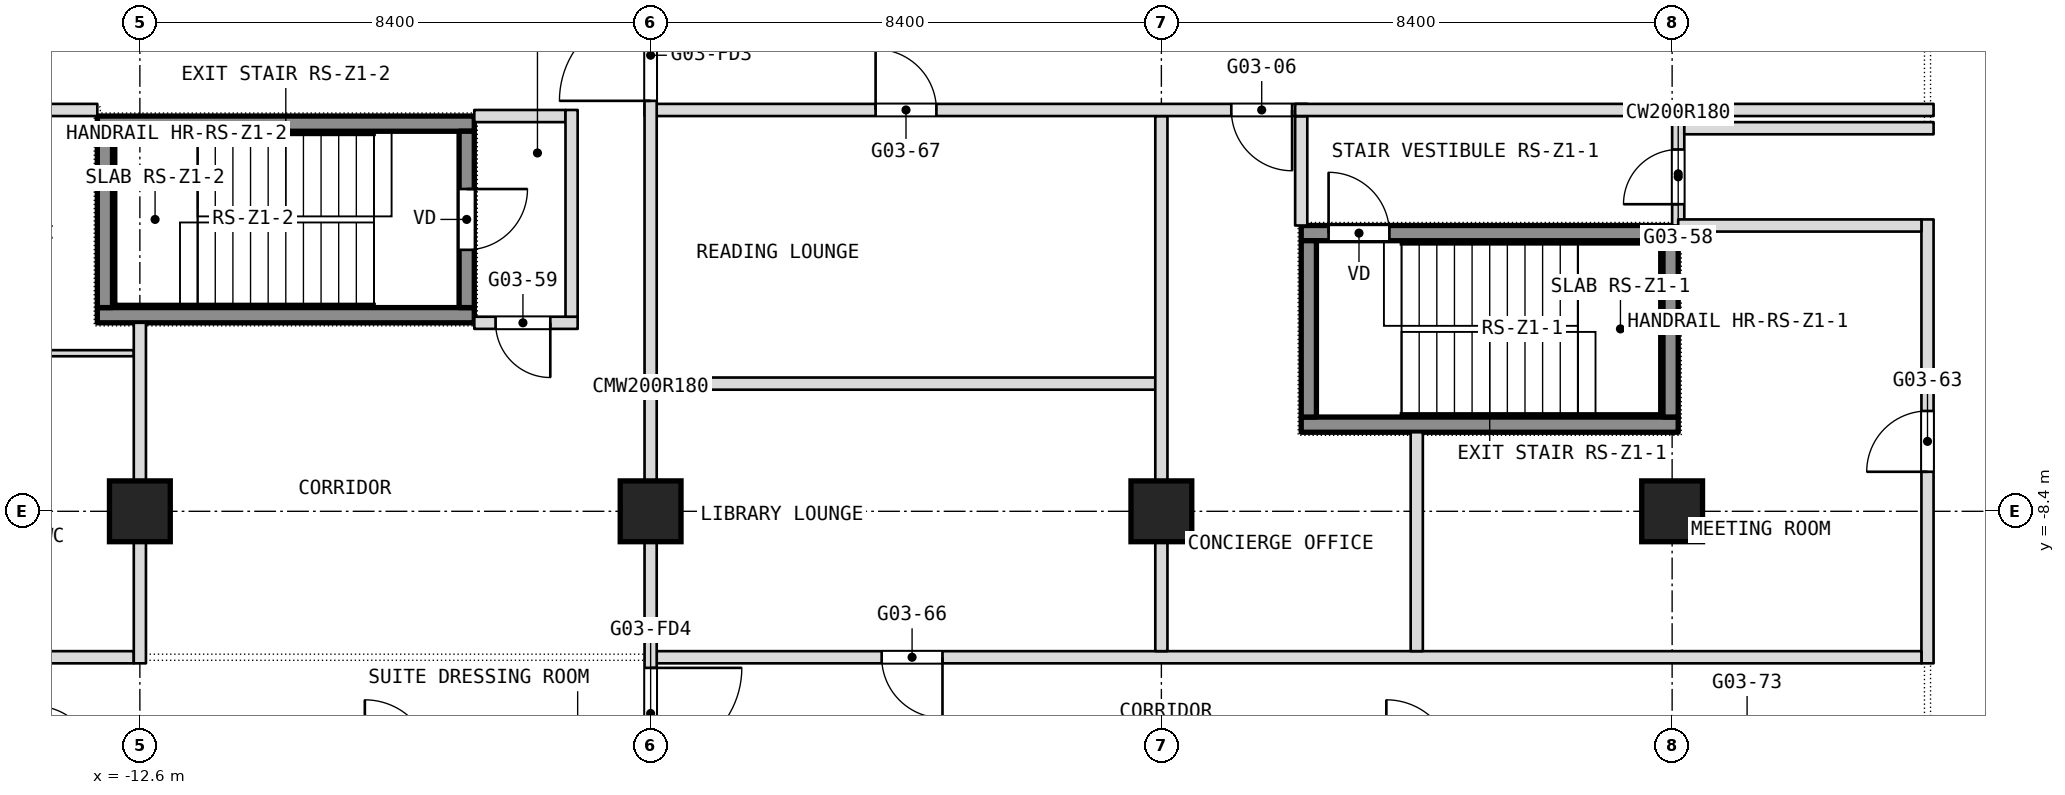
"""IFC4 building model, lengths in metres.
Left out: names, types, materials, properties, quantities, classifications, styles, units other than length and angle.
Written with IfcOpenShell. Run it as: python <this file> out.ifc"""

import sys

from ifc_helpers import new_model, si_unit, direction, frame, frame_2d, origin, origin_2d, place, context, subcontext, project, spatial, rectangle, extrude, element, fill, save


model = new_model("IFC4")
c1 = context("Model", 3, precision=1e-05, world=origin(), true_north=direction((0.0, 1.0)))
c2 = subcontext(c1, "Body", "Model", "MODEL_VIEW")
j1 = project(units=[si_unit("LENGTHUNIT", "METRE"), si_unit("PLANEANGLEUNIT", "RADIAN")], contexts=[c1])
p1 = place(None, origin())
s1 = spatial("IfcSite", under=j1, at=p1, CompositionType="ELEMENT")
p2 = place(p1, origin())
s2 = spatial("IfcBuilding", under=s1, at=p2, CompositionType="ELEMENT")
p3 = place(p2, frame((0.0, 0.0, 50.9)))
s3 = spatial("IfcBuildingStorey", under=s2, at=p3, CompositionType="ELEMENT", Elevation=50.9)
for number, where, z_axis, x_axis in (
    (1, (-12.6, -8.4, 0.0), (0.0, 0.0, 1.0), (1.0, 0.0, 0.0)),
    (2, (-4.2, -8.4, 0.0), (0.0, 0.0, 1.0), (1.0, 0.0, 0.0)),
    (3, (4.2, -8.4, 0.0), (0.0, 0.0, 1.0), (1.0, 0.0, 0.0)),
    (4, (12.6, -8.4, 0.0), (0.0, 0.0, 1.0), (1.0, 0.0, 0.0)),
):
    element("IfcColumn", number, at=place(p3, frame(where, z_axis=z_axis, x_axis=x_axis)), inside=s3, PredefinedType="COLUMN", context=c2, shape_type="SweptSolid", body=[
        extrude(rectangle(XDim=1.0, YDim=1.0, at=origin_2d()), origin(), (0.0, 0.0, 1.0), 3.6),
    ])
p4 = place(p3, frame((16.8, -10.9, 0.0), z_axis=(0.0, 0.0, 1.0), x_axis=(0.0, 1.0, 0.0)))
e5 = element("IfcWall", 5, at=p4, inside=s3, PredefinedType="PARTITIONING", context=c2, shape_type="SweptSolid", body=[
    extrude(rectangle(XDim=7.3, YDim=0.2, at=frame_2d((3.65, 0.0))), origin(), (0.0, 0.0, 1.0), 3.34),
])
p5 = place(p4, frame((3.15, 0.0, 0.0)))
e6 = element("IfcOpeningElement", 6, at=p5, cuts=e5, PredefinedType="OPENING", context=c2, shape_type="SweptSolid", body=[
    extrude(rectangle(XDim=1.0, YDim=2.1, at=frame_2d((0.5, 1.05))), frame((0.0, 0.1, 0.0), z_axis=(0.0, -1.0, 0.0), x_axis=(1.0, 0.0, 0.0)), (0.0, 0.0, 1.0), 0.2),
])
p6 = place(p3, frame((12.7, -3.7, 0.0), z_axis=(0.0, 0.0, 1.0), x_axis=(0.0, 1.0, 0.0)))
e7 = element("IfcWall", 7, at=p6, inside=s3, PredefinedType="PARTITIONING", context=c2, shape_type="SweptSolid", body=[
    extrude(rectangle(XDim=1.7, YDim=0.2, at=frame_2d((0.85, 0.0))), origin(), (0.0, 0.0, 1.0), 3.34),
])
p7 = place(p6, frame((0.35, 0.0, 0.0)))
e8 = element("IfcOpeningElement", 8, at=p7, cuts=e7, PredefinedType="OPENING", context=c2, shape_type="SweptSolid", body=[
    extrude(rectangle(XDim=0.9, YDim=2.1, at=frame_2d((0.45, 1.05))), frame((0.0, 0.1, 0.0), z_axis=(0.0, -1.0, 0.0), x_axis=(1.0, 0.0, 0.0)), (0.0, 0.0, 1.0), 0.2),
])
p8 = place(p3, frame((-16.7, -10.8, 0.0), z_axis=(0.0, 0.0, 1.0), x_axis=(1.0, 0.0, 0.0)))
e9 = element("IfcWall", 9, at=p8, inside=s3, PredefinedType="PARTITIONING", context=c2, shape_type="SweptSolid", body=[
    extrude(rectangle(XDim=4.0, YDim=0.2, at=frame_2d((2.0, 0.0))), origin(), (0.0, 0.0, 1.0), 3.34),
])
p9 = place(p3, frame((-4.1, -10.8, 0.0), z_axis=(0.0, 0.0, 1.0), x_axis=(1.0, 0.0, 0.0)))
e10 = element("IfcWall", 10, at=p9, inside=s3, PredefinedType="PARTITIONING", context=c2, shape_type="SweptSolid", body=[
    extrude(rectangle(XDim=20.8, YDim=0.2, at=frame_2d((10.4, 0.0))), origin(), (0.0, 0.0, 1.0), 3.34),
])
p10 = place(p9, frame((3.7, 0.0, 0.0)))
e11 = element("IfcOpeningElement", 11, at=p10, cuts=e10, PredefinedType="OPENING", context=c2, shape_type="SweptSolid", body=[
    extrude(rectangle(XDim=1.0, YDim=2.1, at=frame_2d((0.5, 1.05))), frame((0.0, 0.1, 0.0), z_axis=(0.0, -1.0, 0.0), x_axis=(1.0, 0.0, 0.0)), (0.0, 0.0, 1.0), 0.2),
])
p11 = place(p3, frame((8.4, -10.7, 0.0), z_axis=(0.0, 0.0, 1.0), x_axis=(0.0, 1.0, 0.0)))
e12 = element("IfcWall", 12, at=p11, inside=s3, PredefinedType="PARTITIONING", context=c2, shape_type="SweptSolid", body=[
    extrude(rectangle(XDim=3.6, YDim=0.2, at=frame_2d((1.8, 0.0))), origin(), (0.0, 0.0, 1.0), 3.34),
])
p12 = place(p3, frame((6.5, -3.7, 0.0), z_axis=(0.0, 0.0, 1.0), x_axis=(0.0, 1.0, 0.0)))
e13 = element("IfcWall", 13, at=p12, inside=s3, PredefinedType="PARTITIONING", context=c2, shape_type="SweptSolid", body=[
    extrude(rectangle(XDim=1.8, YDim=0.2, at=frame_2d((0.9, 0.0))), origin(), (0.0, 0.0, 1.0), 3.34),
])
p13 = place(p3, frame((-4.1, -6.3, 0.0), z_axis=(0.0, 0.0, 1.0), x_axis=(1.0, 0.0, 0.0)))
e14 = element("IfcWall", 14, at=p13, inside=s3, PredefinedType="PARTITIONING", context=c2, shape_type="SweptSolid", body=[
    extrude(rectangle(XDim=8.2, YDim=0.2, at=frame_2d((4.1, 0.0))), origin(), (0.0, 0.0, 1.0), 3.34),
])
p14 = place(p3, frame((-16.7, -5.8, 0.0), z_axis=(0.0, 0.0, 1.0), x_axis=(1.0, 0.0, 0.0)))
e15 = element("IfcWall", 15, at=p14, inside=s3, PredefinedType="PARTITIONING", context=c2, shape_type="SweptSolid", body=[
    extrude(rectangle(XDim=4.0, YDim=0.1, at=frame_2d((2.0, 0.0))), origin(), (0.0, 0.0, 1.0), 3.34),
])
p15 = place(p14, frame((1.55, 0.0, 0.0)))
e16 = element("IfcOpeningElement", 16, at=p15, cuts=e15, PredefinedType="OPENING", context=c2, shape_type="SweptSolid", body=[
    extrude(rectangle(XDim=0.9, YDim=2.1, at=frame_2d((0.45, 1.05))), frame((0.0, 0.05, 0.0), z_axis=(0.0, -1.0, 0.0), x_axis=(1.0, 0.0, 0.0)), (0.0, 0.0, 1.0), 0.1),
])
p16 = place(p3, frame((-7.1, -5.3, 0.0), z_axis=(0.0, 0.0, 1.0), x_axis=(1.0, 0.0, 0.0)))
e17 = element("IfcWall", 17, at=p16, inside=s3, PredefinedType="PARTITIONING", context=c2, shape_type="SweptSolid", body=[
    extrude(rectangle(XDim=1.7, YDim=0.2, at=frame_2d((0.85, 0.0))), origin(), (0.0, 0.0, 1.0), 3.34),
])
p17 = place(p16, frame((0.35, 0.0, 0.0)))
e18 = element("IfcOpeningElement", 18, at=p17, cuts=e17, PredefinedType="OPENING", context=c2, shape_type="SweptSolid", body=[
    extrude(rectangle(XDim=0.9, YDim=2.1, at=frame_2d((0.45, 1.05))), frame((0.0, 0.1, 0.0), z_axis=(0.0, -1.0, 0.0), x_axis=(1.0, 0.0, 0.0)), (0.0, 0.0, 1.0), 0.2),
])
p18 = place(p3, frame((4.2, -10.7, 0.0), z_axis=(0.0, 0.0, 1.0), x_axis=(0.0, 1.0, 0.0)))
e19 = element("IfcWall", 19, at=p18, inside=s3, PredefinedType="PARTITIONING", context=c2, shape_type="SweptSolid", body=[
    extrude(rectangle(XDim=8.8, YDim=0.2, at=frame_2d((4.4, 0.0))), origin(), (0.0, 0.0, 1.0), 3.34),
])
p19 = place(p3, frame((12.7, -3.7, 0.0), z_axis=(0.0, 0.0, 1.0), x_axis=(1.0, 0.0, 0.0)))
e20 = element("IfcWall", 20, at=p19, inside=s3, PredefinedType="PARTITIONING", context=c2, shape_type="SweptSolid", body=[
    extrude(rectangle(XDim=4.0, YDim=0.2, at=frame_2d((2.0, 0.0))), origin(), (0.0, 0.0, 1.0), 3.34),
])
p20 = place(p3, frame((12.8, -2.1, 0.0), z_axis=(0.0, 0.0, 1.0), x_axis=(1.0, 0.0, 0.0)))
e21 = element("IfcWall", 21, at=p20, inside=s3, PredefinedType="PARTITIONING", context=c2, shape_type="SweptSolid", body=[
    extrude(rectangle(XDim=4.1, YDim=0.2, at=frame_2d((2.05, 0.0))), origin(), (0.0, 0.0, 1.0), 3.34),
])
p21 = place(p3, frame((-7.1, -1.9, 0.0), z_axis=(0.0, 0.0, 1.0), x_axis=(1.0, 0.0, 0.0)))
e22 = element("IfcWall", 22, at=p21, inside=s3, PredefinedType="PARTITIONING", context=c2, shape_type="SweptSolid", body=[
    extrude(rectangle(XDim=1.5, YDim=0.2, at=frame_2d((0.75, 0.0))), origin(), (0.0, 0.0, 1.0), 3.34),
])
p22 = place(p3, frame((-16.9, -1.8, 0.0), z_axis=(0.0, 0.0, 1.0), x_axis=(1.0, 0.0, 0.0)))
e23 = element("IfcWall", 23, at=p22, inside=s3, PredefinedType="PARTITIONING", context=c2, shape_type="SweptSolid", body=[
    extrude(rectangle(XDim=3.6, YDim=0.2, at=frame_2d((1.8, 0.0))), origin(), (0.0, 0.0, 1.0), 3.34),
])
p23 = place(p22, frame((1.7, 0.0, 0.0)))
e24 = element("IfcOpeningElement", 24, at=p23, cuts=e23, PredefinedType="OPENING", context=c2, shape_type="SweptSolid", body=[
    extrude(rectangle(XDim=1.0, YDim=2.1, at=frame_2d((0.5, 1.05))), frame((0.0, 0.1, 0.0), z_axis=(0.0, -1.0, 0.0), x_axis=(1.0, 0.0, 0.0)), (0.0, 0.0, 1.0), 0.2),
])
p24 = place(p3, frame((-4.3, -1.8, 0.0), z_axis=(0.0, 0.0, 1.0), x_axis=(1.0, 0.0, 0.0)))
e25 = element("IfcWall", 25, at=p24, inside=s3, PredefinedType="PARTITIONING", context=c2, shape_type="SweptSolid", body=[
    extrude(rectangle(XDim=10.9, YDim=0.2, at=frame_2d((5.45, 0.0))), origin(), (0.0, 0.0, 1.0), 3.34),
])
p25 = place(p24, frame((9.65, 0.0, 0.0)))
e26 = element("IfcOpeningElement", 26, at=p25, cuts=e25, PredefinedType="OPENING", context=c2, shape_type="SweptSolid", body=[
    extrude(rectangle(XDim=1.0, YDim=2.1, at=frame_2d((0.5, 1.05))), frame((0.0, 0.1, 0.0), z_axis=(0.0, -1.0, 0.0), x_axis=(1.0, 0.0, 0.0)), (0.0, 0.0, 1.0), 0.2),
])
p26 = place(p24, frame((3.8, 0.0, 0.0)))
e27 = element("IfcOpeningElement", 27, at=p26, cuts=e25, PredefinedType="OPENING", context=c2, shape_type="SweptSolid", body=[
    extrude(rectangle(XDim=1.0, YDim=2.1, at=frame_2d((0.5, 1.05))), frame((0.0, 0.1, 0.0), z_axis=(0.0, -1.0, 0.0), x_axis=(1.0, 0.0, 0.0)), (0.0, 0.0, 1.0), 0.2),
])
p27 = place(p3, frame((6.4, -1.8, 0.0), z_axis=(0.0, 0.0, 1.0), x_axis=(1.0, 0.0, 0.0)))
e28 = element("IfcWall", 28, at=p27, inside=s3, PredefinedType="PARTITIONING", context=c2, shape_type="SweptSolid", body=[
    extrude(rectangle(XDim=10.5, YDim=0.2, at=frame_2d((5.25, 0.0))), origin(), (0.0, 0.0, 1.0), 3.34),
])
p28 = place(p3, frame((-4.2, -12.7, 0.0), z_axis=(0.0, 0.0, 1.0), x_axis=(0.0, 1.0, 0.0)))
e29 = element("IfcWall", 29, at=p28, inside=s3, PredefinedType="PARTITIONING", context=c2, shape_type="SweptSolid", body=[
    extrude(rectangle(XDim=12.7, YDim=0.2, at=frame_2d((6.35, 0.0))), origin(), (0.0, 0.0, 1.0), 3.34),
])
p29 = place(p28, frame((11.05, 0.0, 0.0)))
e30 = element("IfcOpeningElement", 30, at=p29, cuts=e29, PredefinedType="OPENING", context=c2, shape_type="SweptSolid", body=[
    extrude(rectangle(XDim=1.5, YDim=2.1, at=frame_2d((0.75, 1.05))), frame((0.0, 0.1, 0.0), z_axis=(0.0, -1.0, 0.0), x_axis=(1.0, 0.0, 0.0)), (0.0, 0.0, 1.0), 0.2),
])
p30 = place(p28, frame((0.225, 0.0, 0.0)))
e31 = element("IfcOpeningElement", 31, at=p30, cuts=e29, PredefinedType="OPENING", context=c2, shape_type="SweptSolid", body=[
    extrude(rectangle(XDim=1.5, YDim=2.1, at=frame_2d((0.75, 1.05))), frame((0.0, 0.1, 0.0), z_axis=(0.0, -1.0, 0.0), x_axis=(1.0, 0.0, 0.0)), (0.0, 0.0, 1.0), 0.2),
])
p31 = place(p3, frame((-5.5, -5.2, 0.0), z_axis=(0.0, 0.0, 1.0), x_axis=(0.0, 1.0, 0.0)))
e32 = element("IfcWall", 32, at=p31, inside=s3, PredefinedType="PARTITIONING", context=c2, shape_type="SweptSolid", body=[
    extrude(rectangle(XDim=3.4, YDim=0.2, at=frame_2d((1.7, 0.0))), origin(), (0.0, 0.0, 1.0), 3.34),
])
p32 = place(p3, frame((-12.6, -10.9, 0.0), z_axis=(0.0, 0.0, 1.0), x_axis=(0.0, 1.0, 0.0)))
e33 = element("IfcWall", 33, at=p32, inside=s3, PredefinedType="PARTITIONING", context=c2, shape_type="SweptSolid", body=[
    extrude(rectangle(XDim=5.6, YDim=0.2, at=frame_2d((2.8, 0.0))), origin(), (0.0, 0.0, 1.0), 3.34),
])
p33 = place(p3, frame((6.5, -6.975, 0.1), z_axis=(0.0, 0.0, 1.0), x_axis=(1.0, 0.0, 0.0)))
e34 = element("IfcWall", 34, at=p33, inside=s3, PredefinedType="SHEAR", context=c2, shape_type="SweptSolid", body=[
    extrude(rectangle(XDim=6.2, YDim=0.25, at=frame_2d((3.1, 0.0))), origin(), (0.0, 0.0, 1.0), 3.6),
])
p34 = place(p3, frame((6.5, -3.825, 0.1), z_axis=(0.0, 0.0, 1.0), x_axis=(1.0, 0.0, 0.0)))
e35 = element("IfcWall", 35, at=p34, inside=s3, PredefinedType="SHEAR", context=c2, shape_type="SweptSolid", body=[
    extrude(rectangle(XDim=6.2, YDim=0.25, at=frame_2d((3.1, 0.0))), origin(), (0.0, 0.0, 1.0), 3.6),
])
p35 = place(p34, frame((0.45, 0.0, 0.0)))
e36 = element("IfcOpeningElement", 36, at=p35, cuts=e35, PredefinedType="OPENING", context=c2, shape_type="SweptSolid", body=[
    extrude(rectangle(XDim=1.0, YDim=2.1, at=frame_2d((0.5, 1.05))), frame((0.0, 0.125, 0.0), z_axis=(0.0, -1.0, 0.0), x_axis=(1.0, 0.0, 0.0)), (0.0, 0.0, 1.0), 0.25),
])
for number, where, z_axis, x_axis in (
    (37, (6.625, -6.85, 0.1), (0.0, 0.0, 1.0), (0.0, 1.0, 0.0)),
    (38, (12.575, -6.85, 0.1), (0.0, 0.0, 1.0), (0.0, 1.0, 0.0)),
):
    element("IfcWall", number, at=place(p3, frame(where, z_axis=z_axis, x_axis=x_axis)), inside=s3, PredefinedType="SHEAR", context=c2, shape_type="SweptSolid", body=[
        extrude(rectangle(XDim=2.9, YDim=0.25, at=frame_2d((1.45, 0.0))), origin(), (0.0, 0.0, 1.0), 3.6),
    ])
for number, where, z_axis, x_axis in (
    (39, (-13.3, -5.175, 0.1), (0.0, 0.0, 1.0), (1.0, 0.0, 0.0)),
    (40, (-13.3, -2.025, 0.1), (0.0, 0.0, 1.0), (1.0, 0.0, 0.0)),
):
    element("IfcWall", number, at=place(p3, frame(where, z_axis=z_axis, x_axis=x_axis)), inside=s3, PredefinedType="SHEAR", context=c2, shape_type="SweptSolid", body=[
        extrude(rectangle(XDim=6.2, YDim=0.25, at=frame_2d((3.1, 0.0))), origin(), (0.0, 0.0, 1.0), 3.6),
    ])
p36 = place(p3, frame((-13.175, -5.05, 0.1), z_axis=(0.0, 0.0, 1.0), x_axis=(0.0, 1.0, 0.0)))
e41 = element("IfcWall", 41, at=p36, inside=s3, PredefinedType="SHEAR", context=c2, shape_type="SweptSolid", body=[
    extrude(rectangle(XDim=2.9, YDim=0.25, at=frame_2d((1.45, 0.0))), origin(), (0.0, 0.0, 1.0), 3.6),
])
p37 = place(p3, frame((-7.225, -5.05, 0.1), z_axis=(0.0, 0.0, 1.0), x_axis=(0.0, 1.0, 0.0)))
e42 = element("IfcWall", 42, at=p37, inside=s3, PredefinedType="SHEAR", context=c2, shape_type="SweptSolid", body=[
    extrude(rectangle(XDim=2.9, YDim=0.25, at=frame_2d((1.45, 0.0))), origin(), (0.0, 0.0, 1.0), 3.6),
])
p38 = place(p37, frame((0.95, 0.0, 0.0)))
e43 = element("IfcOpeningElement", 43, at=p38, cuts=e42, PredefinedType="OPENING", context=c2, shape_type="SweptSolid", body=[
    extrude(rectangle(XDim=1.0, YDim=2.1, at=frame_2d((0.5, 1.05))), frame((0.0, 0.125, 0.0), z_axis=(0.0, -1.0, 0.0), x_axis=(1.0, 0.0, 0.0)), (0.0, 0.0, 1.0), 0.25),
])
p39 = place(p5, origin())
e44 = element("IfcDoor", 44, at=p39, inside=s3, OperationType="SINGLE_SWING_LEFT", PredefinedType="DOOR", context=c2, shape_type="SweptSolid", body=[
    extrude(rectangle(XDim=1.0, YDim=2.1, at=frame_2d((0.5, 1.05))), frame((0.0, 0.025, 0.0), z_axis=(0.0, -1.0, 0.0), x_axis=(1.0, 0.0, 0.0)), (0.0, 0.0, 1.0), 0.05),
])
fill(e6, e44)
p40 = place(p7, origin())
e45 = element("IfcDoor", 45, at=p40, inside=s3, OperationType="SINGLE_SWING_LEFT", PredefinedType="DOOR", context=c2, shape_type="SweptSolid", body=[
    extrude(rectangle(XDim=0.9, YDim=2.1, at=frame_2d((0.45, 1.05))), frame((0.0, 0.025, 0.0), z_axis=(0.0, -1.0, 0.0), x_axis=(1.0, 0.0, 0.0)), (0.0, 0.0, 1.0), 0.05),
])
fill(e8, e45)
p41 = place(p10, origin())
e46 = element("IfcDoor", 46, at=p41, inside=s3, OperationType="SINGLE_SWING_RIGHT", PredefinedType="DOOR", context=c2, shape_type="SweptSolid", body=[
    extrude(rectangle(XDim=1.0, YDim=2.1, at=frame_2d((0.5, 1.05))), frame((0.0, 0.025, 0.0), z_axis=(0.0, -1.0, 0.0), x_axis=(1.0, 0.0, 0.0)), (0.0, 0.0, 1.0), 0.05),
])
fill(e11, e46)
p42 = place(p17, origin())
e47 = element("IfcDoor", 47, at=p42, inside=s3, OperationType="SINGLE_SWING_RIGHT", PredefinedType="DOOR", context=c2, shape_type="SweptSolid", body=[
    extrude(rectangle(XDim=0.9, YDim=2.1, at=frame_2d((0.45, 1.05))), frame((0.0, 0.025, 0.0), z_axis=(0.0, -1.0, 0.0), x_axis=(1.0, 0.0, 0.0)), (0.0, 0.0, 1.0), 0.05),
])
fill(e18, e47)
p43 = place(p25, origin())
e48 = element("IfcDoor", 48, at=p43, inside=s3, OperationType="SINGLE_SWING_LEFT", PredefinedType="DOOR", context=c2, shape_type="SweptSolid", body=[
    extrude(rectangle(XDim=1.0, YDim=2.1, at=frame_2d((0.5, 1.05))), frame((0.0, 0.025, 0.0), z_axis=(0.0, -1.0, 0.0), x_axis=(1.0, 0.0, 0.0)), (0.0, 0.0, 1.0), 0.05),
])
fill(e26, e48)
p44 = place(p26, origin())
e49 = element("IfcDoor", 49, at=p44, inside=s3, OperationType="SINGLE_SWING_LEFT", PredefinedType="DOOR", context=c2, shape_type="SweptSolid", body=[
    extrude(rectangle(XDim=1.0, YDim=2.1, at=frame_2d((0.5, 1.05))), frame((0.0, 0.025, 0.0), z_axis=(0.0, -1.0, 0.0), x_axis=(1.0, 0.0, 0.0)), (0.0, 0.0, 1.0), 0.05),
])
fill(e27, e49)
p45 = place(p35, origin())
e50 = element("IfcDoor", 50, at=p45, inside=s3, OperationType="SINGLE_SWING_LEFT", PredefinedType="DOOR", context=c2, shape_type="SweptSolid", body=[
    extrude(rectangle(XDim=1.0, YDim=2.1, at=frame_2d((0.5, 1.05))), frame((0.0, 0.025, 0.0), z_axis=(0.0, -1.0, 0.0), x_axis=(1.0, 0.0, 0.0)), (0.0, 0.0, 1.0), 0.05),
])
fill(e36, e50)
p46 = place(p38, origin())
e51 = element("IfcDoor", 51, at=p46, inside=s3, OperationType="SINGLE_SWING_LEFT", PredefinedType="DOOR", context=c2, shape_type="SweptSolid", body=[
    extrude(rectangle(XDim=1.0, YDim=2.1, at=frame_2d((0.5, 1.05))), frame((0.0, 0.025, 0.0), z_axis=(0.0, -1.0, 0.0), x_axis=(1.0, 0.0, 0.0)), (0.0, 0.0, 1.0), 0.05),
])
fill(e43, e51)
p47 = place(p29, origin())
e52 = element("IfcDoor", 52, at=p47, inside=s3, OperationType="DOUBLE_DOOR_DOUBLE_SWING", PredefinedType="DOOR", context=c2, shape_type="SweptSolid", body=[
    extrude(rectangle(XDim=1.5, YDim=2.1, at=frame_2d((0.75, 1.05))), frame((0.0, 0.025, 0.0), z_axis=(0.0, -1.0, 0.0), x_axis=(1.0, 0.0, 0.0)), (0.0, 0.0, 1.0), 0.05),
])
fill(e30, e52)
p48 = place(p30, origin())
e53 = element("IfcDoor", 53, at=p48, inside=s3, OperationType="DOUBLE_DOOR_DOUBLE_SWING", PredefinedType="DOOR", context=c2, shape_type="SweptSolid", body=[
    extrude(rectangle(XDim=1.5, YDim=2.1, at=frame_2d((0.75, 1.05))), frame((0.0, 0.025, 0.0), z_axis=(0.0, -1.0, 0.0), x_axis=(1.0, 0.0, 0.0)), (0.0, 0.0, 1.0), 0.05),
])
fill(e31, e53)
save(model, sys.argv[1])
